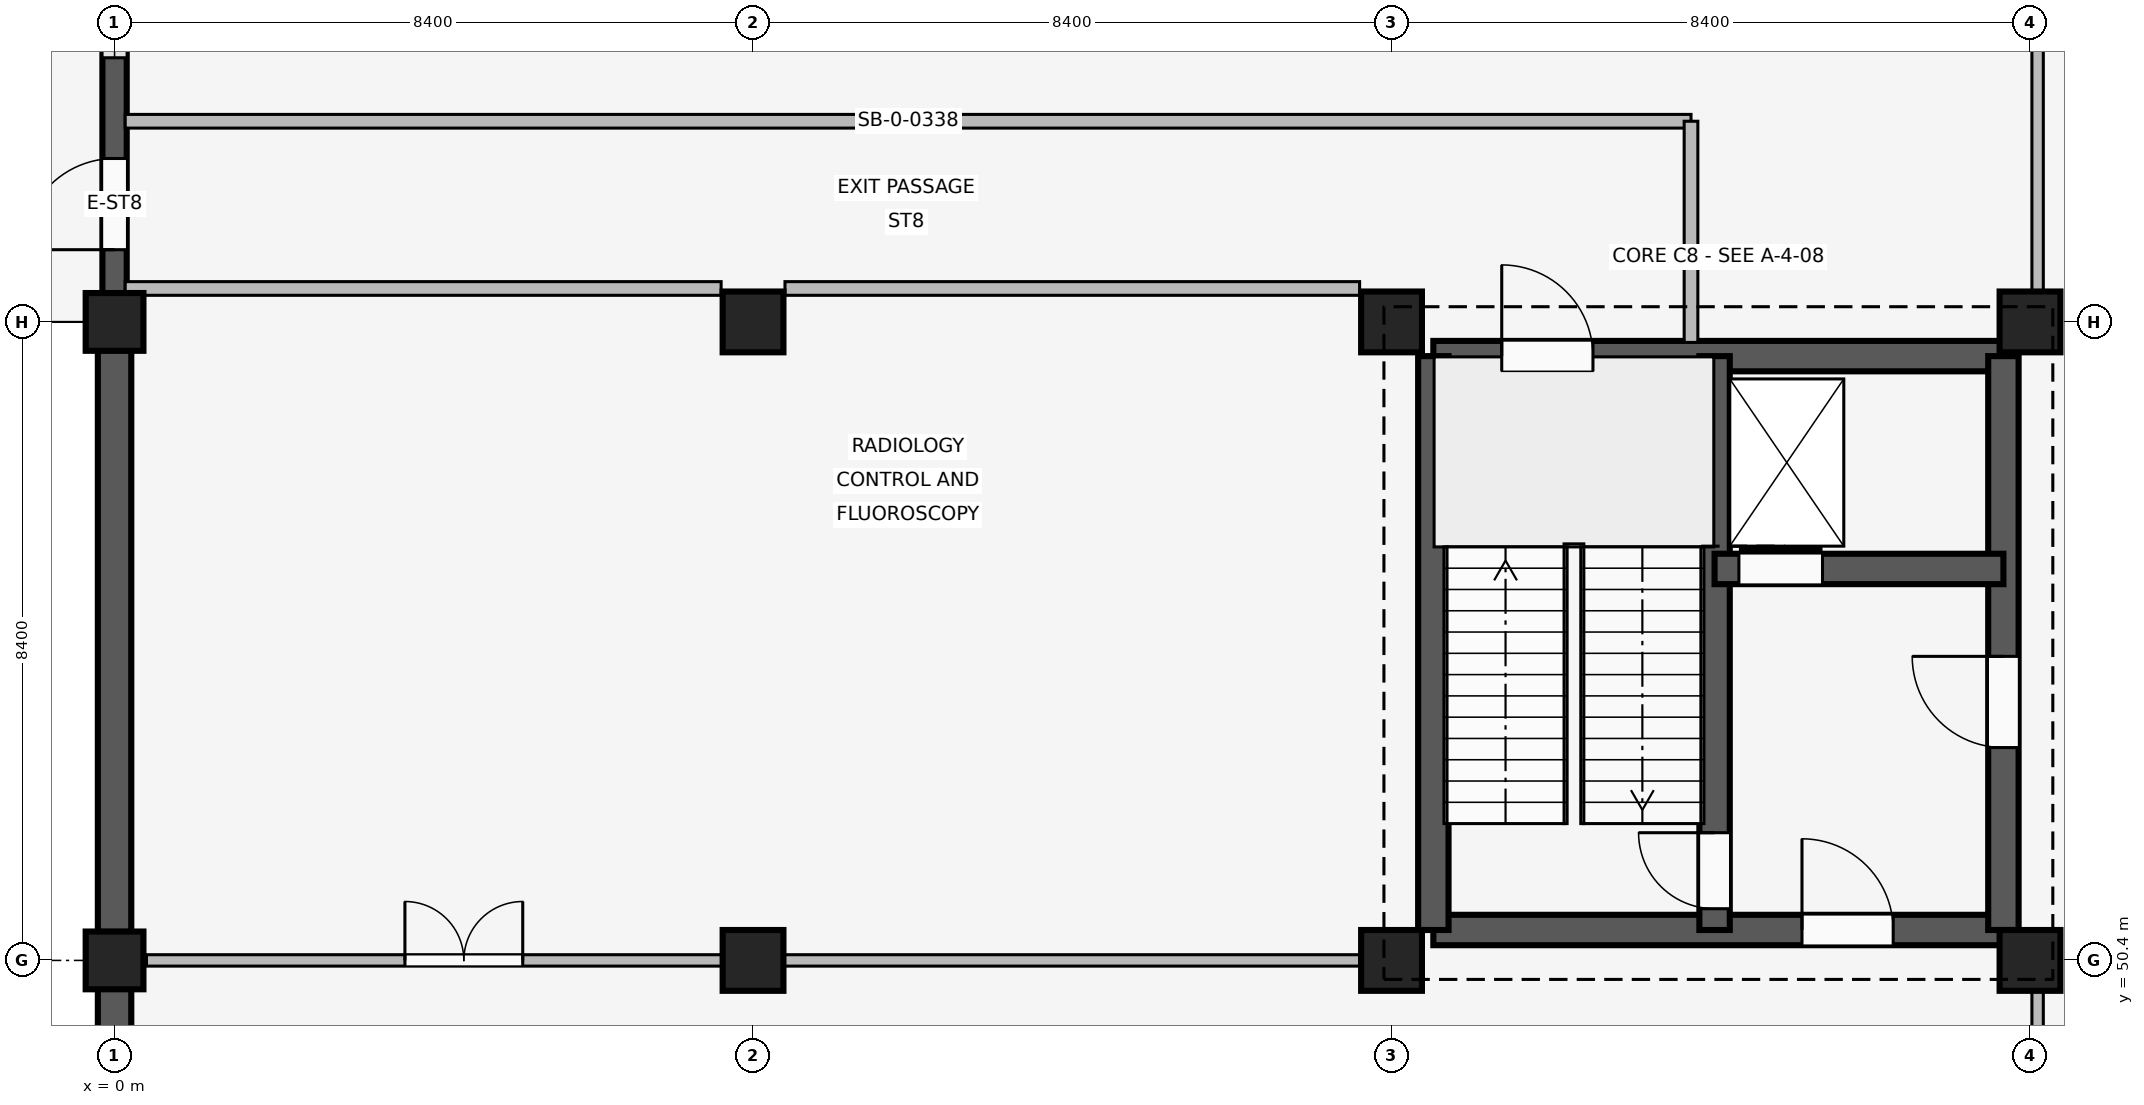
"""IFC4 building model, lengths in metres.
Left out: names, types, materials, properties, quantities, classifications, styles, units other than length and angle.
Written with IfcOpenShell. Run it as: python <this file> out.ifc"""

import sys

from ifc_helpers import new_model, si_unit, direction, frame, frame_2d, origin, origin_2d, place, context, subcontext, project, spatial, rectangle, extrude, element, fill, save


model = new_model("IFC4")
c1 = context("Model", 3, precision=1e-05, world=origin(), true_north=direction((0.0, 1.0)))
c2 = subcontext(c1, "Body", "Model", "MODEL_VIEW")
j1 = project(units=[si_unit("LENGTHUNIT", "METRE"), si_unit("PLANEANGLEUNIT", "RADIAN")], contexts=[c1])
p1 = place(None, origin())
s1 = spatial("IfcSite", under=j1, at=p1, CompositionType="ELEMENT")
p2 = place(p1, origin())
s2 = spatial("IfcBuilding", under=s1, at=p2, CompositionType="ELEMENT")
p3 = place(p2, origin())
s3 = spatial("IfcBuildingStorey", under=s2, at=p3, CompositionType="ELEMENT", Elevation=0.0)
for number, where, z_axis, x_axis in (
    (1, (0.0, 50.4, 0.0), (0.0, 0.0, 1.0), (1.0, 0.0, 0.0)),
    (2, (0.0, 58.8, 0.0), (0.0, 0.0, 1.0), (1.0, 0.0, 0.0)),
):
    element("IfcColumn", number, at=place(p3, frame(where, z_axis=z_axis, x_axis=x_axis)), inside=s3, PredefinedType="COLUMN", context=c2, shape_type="SweptSolid", body=[
        extrude(rectangle(XDim=0.76, YDim=0.76, at=origin_2d()), origin(), (0.0, 0.0, 1.0), 4.8),
    ])
for number, where, z_axis, x_axis in (
    (3, (8.4, 50.4, 0.0), (0.0, 0.0, 1.0), (1.0, 0.0, 0.0)),
    (4, (8.4, 58.8, 0.0), (0.0, 0.0, 1.0), (1.0, 0.0, 0.0)),
    (5, (16.8, 50.4, 0.0), (0.0, 0.0, 1.0), (1.0, 0.0, 0.0)),
    (6, (16.8, 58.8, 0.0), (0.0, 0.0, 1.0), (1.0, 0.0, 0.0)),
    (7, (25.2, 50.4, 0.0), (0.0, 0.0, 1.0), (1.0, 0.0, 0.0)),
    (8, (25.2, 58.8, 0.0), (0.0, 0.0, 1.0), (1.0, 0.0, 0.0)),
):
    element("IfcColumn", number, at=place(p3, frame(where, z_axis=z_axis, x_axis=x_axis)), inside=s3, PredefinedType="COLUMN", context=c2, shape_type="SweptSolid", body=[
        extrude(rectangle(XDim=0.8, YDim=0.8, at=origin_2d()), origin(), (0.0, 0.0, 1.0), 4.8),
    ])
p4 = place(p3, frame((0.0, 42.375, 0.0), z_axis=(0.0, 0.0, 1.0), x_axis=(0.0, 1.0, 0.0)))
e9 = element("IfcWall", 9, at=p4, inside=s3, PredefinedType="SOLIDWALL", context=c2, shape_type="SweptSolid", body=[
    extrude(rectangle(XDim=7.65, YDim=0.44, at=frame_2d((3.825, 0.0))), origin(), (0.0, 0.0, 1.0), 3.82),
])
p5 = place(p3, frame((0.0, 50.775, 0.0), z_axis=(0.0, 0.0, 1.0), x_axis=(0.0, 1.0, 0.0)))
e10 = element("IfcWall", 10, at=p5, inside=s3, PredefinedType="SOLIDWALL", context=c2, shape_type="SweptSolid", body=[
    extrude(rectangle(XDim=7.65, YDim=0.44, at=frame_2d((3.825, 0.0))), origin(), (0.0, 0.0, 1.0), 3.82),
])
p6 = place(p3, frame((0.0, 59.175, 0.0), z_axis=(0.0, 0.0, 1.0), x_axis=(0.0, 1.0, 0.0)))
e11 = element("IfcWall", 11, at=p6, inside=s3, PredefinedType="SOLIDWALL", context=c2, shape_type="SweptSolid", body=[
    extrude(rectangle(XDim=7.65, YDim=0.32, at=frame_2d((3.825, 0.0))), origin(), (0.0, 0.0, 1.0), 3.82),
])
p7 = place(p6, frame((0.575, 0.0, 0.0)))
e12 = element("IfcOpeningElement", 12, at=p7, cuts=e11, PredefinedType="OPENING", context=c2, shape_type="SweptSolid", body=[
    extrude(rectangle(XDim=1.2, YDim=2.25, at=frame_2d((0.6, 1.125))), frame((0.0, 0.17, 0.0), z_axis=(0.0, -1.0, 0.0), x_axis=(1.0, 0.0, 0.0)), (0.0, 0.0, 1.0), 0.34),
])
p8 = place(p6, frame((3.1, 0.0, 0.85)))
e13 = element("IfcOpeningElement", 13, at=p8, cuts=e11, PredefinedType="OPENING", context=c2, shape_type="SweptSolid", body=[
    extrude(rectangle(XDim=1.58, YDim=1.7, at=frame_2d((0.79, 0.85))), frame((0.0, 0.17, 0.0), z_axis=(0.0, -1.0, 0.0), x_axis=(1.0, 0.0, 0.0)), (0.0, 0.0, 1.0), 0.34),
])
p9 = place(p6, frame((5.35, 0.0, 0.85)))
e14 = element("IfcOpeningElement", 14, at=p9, cuts=e11, PredefinedType="OPENING", context=c2, shape_type="SweptSolid", body=[
    extrude(rectangle(XDim=1.58, YDim=1.7, at=frame_2d((0.79, 0.85))), frame((0.0, 0.17, 0.0), z_axis=(0.0, -1.0, 0.0), x_axis=(1.0, 0.0, 0.0)), (0.0, 0.0, 1.0), 0.34),
])
p10 = place(p3, frame((17.35, 50.8, 0.0), z_axis=(0.0, 0.0, 1.0), x_axis=(1.0, 0.0, 0.0)))
e15 = element("IfcWall", 15, at=p10, inside=s3, PredefinedType="SHEAR", context=c2, shape_type="SweptSolid", body=[
    extrude(rectangle(XDim=7.5, YDim=0.4, at=frame_2d((3.75, 0.0))), origin(), (0.0, 0.0, 1.0), 4.64),
])
p11 = place(p10, frame((4.85, 0.0, 0.0)))
e16 = element("IfcOpeningElement", 16, at=p11, cuts=e15, PredefinedType="OPENING", context=c2, shape_type="SweptSolid", body=[
    extrude(rectangle(XDim=1.2, YDim=2.2, at=frame_2d((0.6, 1.1))), frame((0.0, 0.21, 0.0), z_axis=(0.0, -1.0, 0.0), x_axis=(1.0, 0.0, 0.0)), (0.0, 0.0, 1.0), 0.42),
])
p12 = place(p3, frame((17.35, 58.35, 0.0), z_axis=(0.0, 0.0, 1.0), x_axis=(1.0, 0.0, 0.0)))
e17 = element("IfcWall", 17, at=p12, inside=s3, PredefinedType="SHEAR", context=c2, shape_type="SweptSolid", body=[
    extrude(rectangle(XDim=7.5, YDim=0.4, at=frame_2d((3.75, 0.0))), origin(), (0.0, 0.0, 1.0), 4.64),
])
p13 = place(p12, frame((0.9, 0.0, 0.0)))
e18 = element("IfcOpeningElement", 18, at=p13, cuts=e17, PredefinedType="OPENING", context=c2, shape_type="SweptSolid", body=[
    extrude(rectangle(XDim=1.2, YDim=2.1, at=frame_2d((0.6, 1.05))), frame((0.0, 0.21, 0.0), z_axis=(0.0, -1.0, 0.0), x_axis=(1.0, 0.0, 0.0)), (0.0, 0.0, 1.0), 0.42),
])
p14 = place(p3, frame((17.35, 50.8, 0.0), z_axis=(0.0, 0.0, 1.0), x_axis=(0.0, 1.0, 0.0)))
e19 = element("IfcWall", 19, at=p14, inside=s3, PredefinedType="SHEAR", context=c2, shape_type="SweptSolid", body=[
    extrude(rectangle(XDim=7.55, YDim=0.4, at=frame_2d((3.775, 0.0))), origin(), (0.0, 0.0, 1.0), 4.64),
])
p15 = place(p3, frame((24.85, 50.8, 0.0), z_axis=(0.0, 0.0, 1.0), x_axis=(0.0, 1.0, 0.0)))
e20 = element("IfcWall", 20, at=p15, inside=s3, PredefinedType="SHEAR", context=c2, shape_type="SweptSolid", body=[
    extrude(rectangle(XDim=7.55, YDim=0.4, at=frame_2d((3.775, 0.0))), origin(), (0.0, 0.0, 1.0), 4.64),
])
p16 = place(p15, frame((2.4, 0.0, 0.0)))
e21 = element("IfcOpeningElement", 21, at=p16, cuts=e20, PredefinedType="OPENING", context=c2, shape_type="SweptSolid", body=[
    extrude(rectangle(XDim=1.2, YDim=2.2, at=frame_2d((0.6, 1.1))), frame((0.0, 0.21, 0.0), z_axis=(0.0, -1.0, 0.0), x_axis=(1.0, 0.0, 0.0)), (0.0, 0.0, 1.0), 0.42),
])
p17 = place(p3, frame((21.05, 50.8, 0.0), z_axis=(0.0, 0.0, 1.0), x_axis=(0.0, 1.0, 0.0)))
e22 = element("IfcWall", 22, at=p17, inside=s3, PredefinedType="SHEAR", context=c2, shape_type="SweptSolid", body=[
    extrude(rectangle(XDim=7.55, YDim=0.4, at=frame_2d((3.775, 0.0))), origin(), (0.0, 0.0, 1.0), 4.64),
])
p18 = place(p17, frame((0.28, 0.0, 0.0)))
e23 = element("IfcOpeningElement", 23, at=p18, cuts=e22, PredefinedType="OPENING", context=c2, shape_type="SweptSolid", body=[
    extrude(rectangle(XDim=1.0, YDim=2.15, at=frame_2d((0.5, 1.075))), frame((0.0, 0.21, 0.0), z_axis=(0.0, -1.0, 0.0), x_axis=(1.0, 0.0, 0.0)), (0.0, 0.0, 1.0), 0.42),
])
p19 = place(p3, frame((21.05, 55.55, 0.0), z_axis=(0.0, 0.0, 1.0), x_axis=(1.0, 0.0, 0.0)))
e24 = element("IfcWall", 24, at=p19, inside=s3, PredefinedType="SHEAR", context=c2, shape_type="SweptSolid", body=[
    extrude(rectangle(XDim=3.8, YDim=0.4, at=frame_2d((1.9, 0.0))), origin(), (0.0, 0.0, 1.0), 4.64),
])
p20 = place(p19, frame((0.32, 0.0, 0.0)))
e25 = element("IfcOpeningElement", 25, at=p20, cuts=e24, PredefinedType="OPENING", context=c2, shape_type="SweptSolid", body=[
    extrude(rectangle(XDim=1.1, YDim=2.15, at=frame_2d((0.55, 1.075))), frame((0.0, 0.21, 0.0), z_axis=(0.0, -1.0, 0.0), x_axis=(1.0, 0.0, 0.0)), (0.0, 0.0, 1.0), 0.42),
])
p21 = place(p3, frame((25.3, 34.0, 0.0), z_axis=(0.0, 0.0, 1.0), x_axis=(0.0, 1.0, 0.0)))
e26 = element("IfcWall", 26, at=p21, inside=s3, PredefinedType="PARTITIONING", context=c2, shape_type="SweptSolid", body=[
    extrude(rectangle(XDim=16.0, YDim=0.15, at=frame_2d((8.0, 0.0))), origin(), (0.0, 0.0, 1.0), 3.8),
])
p22 = place(p21, frame((3.4, 0.0, 0.0)))
e27 = element("IfcOpeningElement", 27, at=p22, cuts=e26, PredefinedType="OPENING", context=c2, shape_type="SweptSolid", body=[
    extrude(rectangle(XDim=1.55, YDim=2.3, at=frame_2d((0.775, 1.15))), frame((0.0, 0.085, 0.0), z_axis=(0.0, -1.0, 0.0), x_axis=(1.0, 0.0, 0.0)), (0.0, 0.0, 1.0), 0.17),
])
p23 = place(p3, frame((0.42, 50.4, 0.0), z_axis=(0.0, 0.0, 1.0), x_axis=(1.0, 0.0, 0.0)))
e28 = element("IfcWall", 28, at=p23, inside=s3, PredefinedType="PARTITIONING", context=c2, shape_type="SweptSolid", body=[
    extrude(rectangle(XDim=15.96, YDim=0.15, at=frame_2d((7.98, 0.0))), origin(), (0.0, 0.0, 1.0), 3.8),
])
p24 = place(p23, frame((3.4, 0.0, 0.0)))
e29 = element("IfcOpeningElement", 29, at=p24, cuts=e28, PredefinedType="OPENING", context=c2, shape_type="SweptSolid", body=[
    extrude(rectangle(XDim=1.55, YDim=2.3, at=frame_2d((0.775, 1.15))), frame((0.0, 0.085, 0.0), z_axis=(0.0, -1.0, 0.0), x_axis=(1.0, 0.0, 0.0)), (0.0, 0.0, 1.0), 0.17),
])
p25 = place(p3, frame((25.3, 59.2, 0.0), z_axis=(0.0, 0.0, 1.0), x_axis=(0.0, 1.0, 0.0)))
e30 = element("IfcWall", 30, at=p25, inside=s3, PredefinedType="PARTITIONING", context=c2, shape_type="SweptSolid", body=[
    extrude(rectangle(XDim=16.0, YDim=0.15, at=frame_2d((8.0, 0.0))), origin(), (0.0, 0.0, 1.0), 3.8),
])
p26 = place(p25, frame((3.4, 0.0, 0.0)))
e31 = element("IfcOpeningElement", 31, at=p26, cuts=e30, PredefinedType="OPENING", context=c2, shape_type="SweptSolid", body=[
    extrude(rectangle(XDim=1.1, YDim=2.2, at=frame_2d((0.55, 1.1))), frame((0.0, 0.085, 0.0), z_axis=(0.0, -1.0, 0.0), x_axis=(1.0, 0.0, 0.0)), (0.0, 0.0, 1.0), 0.17),
])
p27 = place(p3, frame((0.14, 61.44, 0.0), z_axis=(0.0, 0.0, 1.0), x_axis=(1.0, 0.0, 0.0)))
e32 = element("IfcWall", 32, at=p27, inside=s3, PredefinedType="PARTITIONING", context=c2, shape_type="SweptSolid", body=[
    extrude(rectangle(XDim=20.6, YDim=0.18, at=frame_2d((10.3, 0.0))), origin(), (0.0, 0.0, 1.0), 3.8),
])
p28 = place(p3, frame((20.74, 58.53, 0.0), z_axis=(0.0, 0.0, 1.0), x_axis=(0.0, 1.0, 0.0)))
e33 = element("IfcWall", 33, at=p28, inside=s3, PredefinedType="PARTITIONING", context=c2, shape_type="SweptSolid", body=[
    extrude(rectangle(XDim=2.91, YDim=0.18, at=frame_2d((1.455, 0.0))), origin(), (0.0, 0.0, 1.0), 3.8),
])
p29 = place(p3, frame((0.14, 59.24, 0.0), z_axis=(0.0, 0.0, 1.0), x_axis=(1.0, 0.0, 0.0)))
e34 = element("IfcWall", 34, at=p29, inside=s3, PredefinedType="PARTITIONING", context=c2, shape_type="SweptSolid", body=[
    extrude(rectangle(XDim=7.84, YDim=0.18, at=frame_2d((3.92, 0.0))), origin(), (0.0, 0.0, 1.0), 3.8),
])
p30 = place(p3, frame((8.82, 59.24, 0.0), z_axis=(0.0, 0.0, 1.0), x_axis=(1.0, 0.0, 0.0)))
e35 = element("IfcWall", 35, at=p30, inside=s3, PredefinedType="PARTITIONING", context=c2, shape_type="SweptSolid", body=[
    extrude(rectangle(XDim=7.56, YDim=0.18, at=frame_2d((3.78, 0.0))), origin(), (0.0, 0.0, 1.0), 3.8),
])
p31 = place(p7, origin())
e36 = element("IfcDoor", 36, at=p31, inside=s3, OperationType="SINGLE_SWING_LEFT", PredefinedType="DOOR", context=c2, shape_type="SweptSolid", body=[
    extrude(rectangle(XDim=1.2, YDim=2.25, at=frame_2d((0.6, 1.125))), frame((0.0, 0.025, 0.0), z_axis=(0.0, -1.0, 0.0), x_axis=(1.0, 0.0, 0.0)), (0.0, 0.0, 1.0), 0.05),
])
fill(e12, e36)
p32 = place(p8, origin())
e37 = element("IfcWindow", 37, at=p32, inside=s3, PartitioningType="SINGLE_PANEL", PredefinedType="WINDOW", context=c2, shape_type="SweptSolid", body=[
    extrude(rectangle(XDim=1.58, YDim=1.7, at=frame_2d((0.79, 0.85))), frame((0.0, 0.03, 0.0), z_axis=(0.0, -1.0, 0.0), x_axis=(1.0, 0.0, 0.0)), (0.0, 0.0, 1.0), 0.06),
])
fill(e13, e37)
p33 = place(p16, origin())
e38 = element("IfcDoor", 38, at=p33, inside=s3, OperationType="SINGLE_SWING_RIGHT", PredefinedType="DOOR", context=c2, shape_type="SweptSolid", body=[
    extrude(rectangle(XDim=1.2, YDim=2.2, at=frame_2d((0.6, 1.1))), frame((0.0, 0.025, 0.0), z_axis=(0.0, -1.0, 0.0), x_axis=(1.0, 0.0, 0.0)), (0.0, 0.0, 1.0), 0.05),
])
fill(e21, e38)
p34 = place(p11, origin())
e39 = element("IfcDoor", 39, at=p34, inside=s3, OperationType="SINGLE_SWING_LEFT", PredefinedType="DOOR", context=c2, shape_type="SweptSolid", body=[
    extrude(rectangle(XDim=1.2, YDim=2.2, at=frame_2d((0.6, 1.1))), frame((0.0, 0.025, 0.0), z_axis=(0.0, -1.0, 0.0), x_axis=(1.0, 0.0, 0.0)), (0.0, 0.0, 1.0), 0.05),
])
fill(e16, e39)
p35 = place(p18, origin())
e40 = element("IfcDoor", 40, at=p35, inside=s3, OperationType="SINGLE_SWING_RIGHT", PredefinedType="DOOR", context=c2, shape_type="SweptSolid", body=[
    extrude(rectangle(XDim=1.0, YDim=2.15, at=frame_2d((0.5, 1.075))), frame((0.0, 0.025, 0.0), z_axis=(0.0, -1.0, 0.0), x_axis=(1.0, 0.0, 0.0)), (0.0, 0.0, 1.0), 0.05),
])
fill(e23, e40)
p36 = place(p13, origin())
e41 = element("IfcDoor", 41, at=p36, inside=s3, OperationType="SINGLE_SWING_LEFT", PredefinedType="DOOR", context=c2, shape_type="SweptSolid", body=[
    extrude(rectangle(XDim=1.2, YDim=2.1, at=frame_2d((0.6, 1.05))), frame((0.0, 0.025, 0.0), z_axis=(0.0, -1.0, 0.0), x_axis=(1.0, 0.0, 0.0)), (0.0, 0.0, 1.0), 0.05),
])
fill(e18, e41)
p37 = place(p20, origin())
e42 = element("IfcDoor", 42, at=p37, inside=s3, OperationType="SLIDING_TO_LEFT", PredefinedType="DOOR", context=c2, shape_type="SweptSolid", body=[
    extrude(rectangle(XDim=1.1, YDim=2.15, at=frame_2d((0.55, 1.075))), frame((0.0, 0.025, 0.0), z_axis=(0.0, -1.0, 0.0), x_axis=(1.0, 0.0, 0.0)), (0.0, 0.0, 1.0), 0.05),
])
fill(e25, e42)
p38 = place(p24, origin())
e43 = element("IfcDoor", 43, at=p38, inside=s3, OperationType="DOUBLE_SWING_LEFT", PredefinedType="DOOR", context=c2, shape_type="SweptSolid", body=[
    extrude(rectangle(XDim=1.55, YDim=2.3, at=frame_2d((0.775, 1.15))), frame((0.0, 0.025, 0.0), z_axis=(0.0, -1.0, 0.0), x_axis=(1.0, 0.0, 0.0)), (0.0, 0.0, 1.0), 0.05),
])
fill(e29, e43)
save(model, sys.argv[1])
